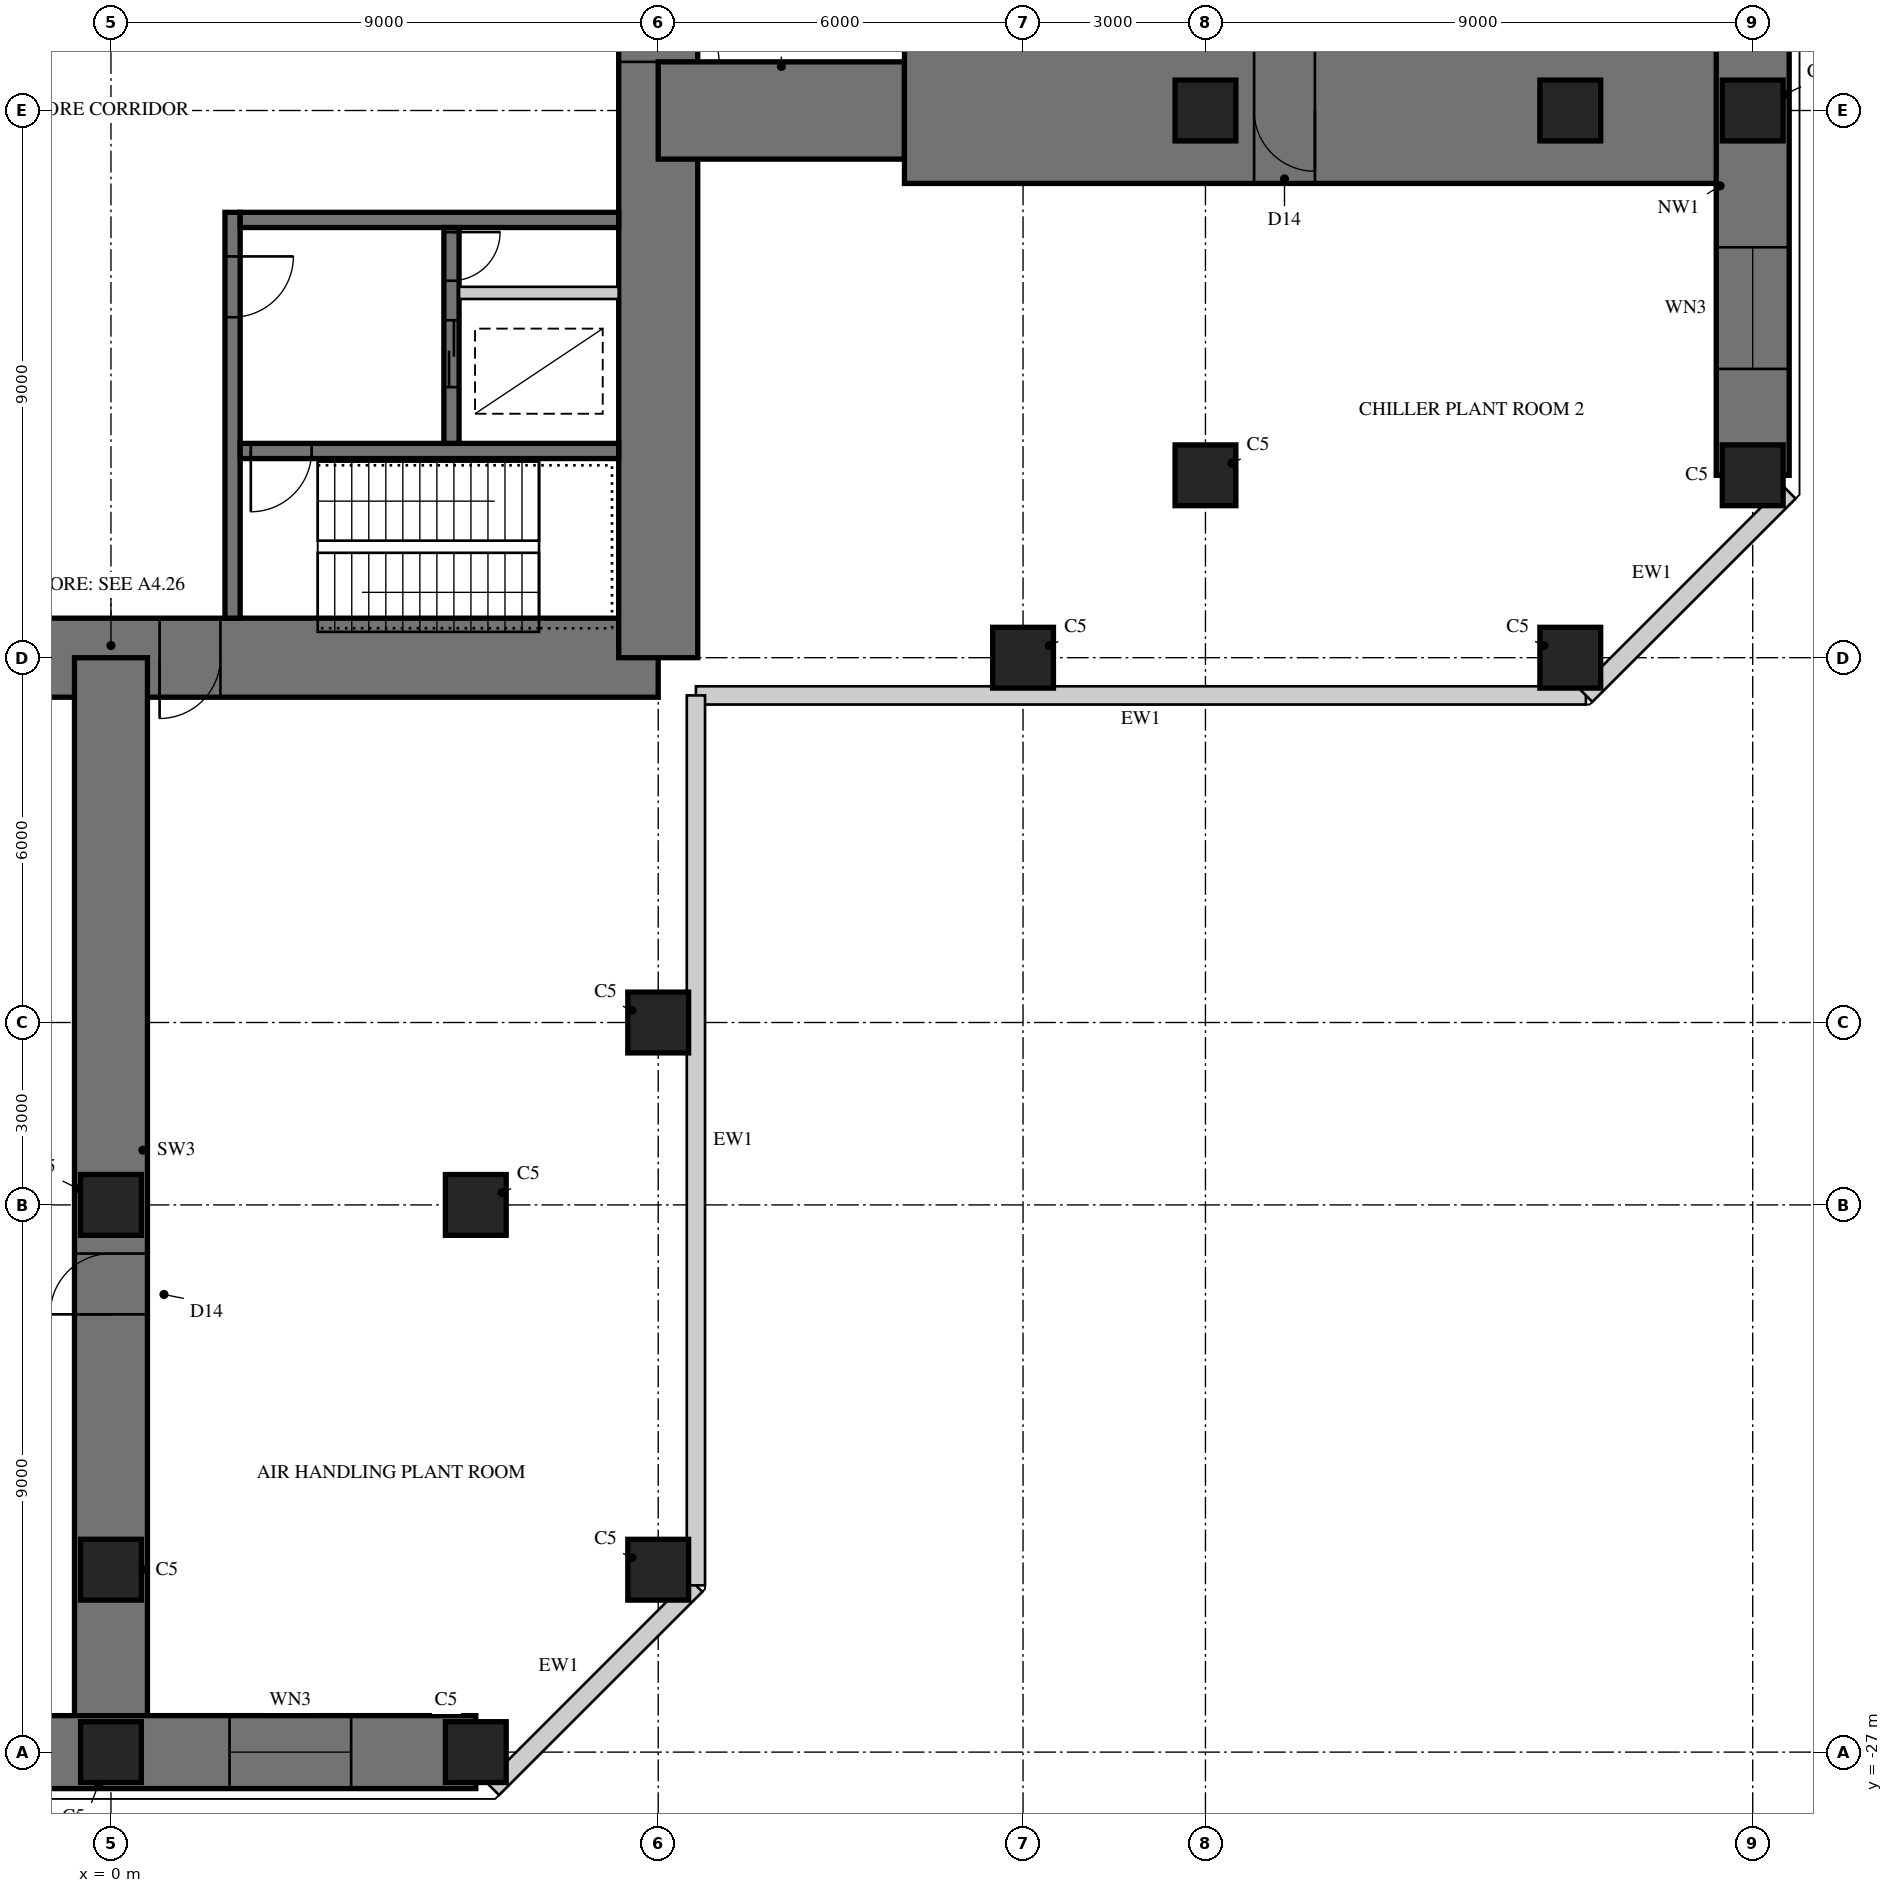
"""IFC4 building model, lengths in metres.
Left out: names, types, materials, properties, quantities, classifications, styles, units other than length and angle.
Written with IfcOpenShell. Run it as: python <this file> out.ifc"""

import sys

from ifc_helpers import new_model, si_unit, direction, frame, frame_2d, origin, origin_2d, place, context, subcontext, project, spatial, rectangle, hollow_rectangle, extrude, element, fill, save


model = new_model("IFC4")
c1 = context("Model", 3, precision=1e-05, world=origin(), true_north=direction((0.0, 1.0)))
c2 = subcontext(c1, "Body", "Model", "MODEL_VIEW")
j1 = project(units=[si_unit("LENGTHUNIT", "METRE"), si_unit("PLANEANGLEUNIT", "RADIAN")], contexts=[c1])
p1 = place(None, origin())
s1 = spatial("IfcSite", under=j1, at=p1, CompositionType="ELEMENT")
p2 = place(p1, origin())
s2 = spatial("IfcBuilding", under=s1, at=p2, CompositionType="ELEMENT")
p3 = place(p2, frame((0.0, 0.0, 164.5)))
s3 = spatial("IfcBuildingStorey", under=s2, at=p3, CompositionType="ELEMENT", Elevation=164.5)
p4 = place(p3, frame((-9.0, -9.0, 0.0), z_axis=(0.0, 0.0, 1.0), x_axis=(1.0, 0.0, 0.0)))
e1 = element("IfcWall", 1, at=p4, inside=s3, PredefinedType="SHEAR", context=c2, shape_type="SweptSolid", body=[
    extrude(rectangle(XDim=18.0, YDim=1.3, at=frame_2d((9.0, 0.0))), origin(), (0.0, 0.0, 1.0), 5.0),
])
p5 = place(p4, frame((9.8, 0.0, 0.0)))
e2 = element("IfcOpeningElement", 2, at=p5, cuts=e1, PredefinedType="OPENING", context=c2, shape_type="SweptSolid", body=[
    extrude(rectangle(XDim=1.0, YDim=2.4, at=frame_2d((0.5, 1.2))), frame((0.0, 0.66, 0.0), z_axis=(0.0, -1.0, 0.0), x_axis=(1.0, 0.0, 0.0)), (0.0, 0.0, 1.0), 1.32),
])
p6 = place(p3, frame((9.0, -9.0, 0.0), z_axis=(0.0, 0.0, 1.0), x_axis=(0.0, 1.0, 0.0)))
e3 = element("IfcWall", 3, at=p6, inside=s3, PredefinedType="SHEAR", context=c2, shape_type="SweptSolid", body=[
    extrude(rectangle(XDim=18.0, YDim=1.3, at=frame_2d((9.0, 0.0))), origin(), (0.0, 0.0, 1.0), 5.0),
])
p7 = place(p6, frame((9.8, 0.0, 0.0)))
e4 = element("IfcOpeningElement", 4, at=p7, cuts=e3, PredefinedType="OPENING", context=c2, shape_type="SweptSolid", body=[
    extrude(rectangle(XDim=1.0, YDim=2.4, at=frame_2d((0.5, 1.2))), frame((0.0, 0.66, 0.0), z_axis=(0.0, -1.0, 0.0), x_axis=(1.0, 0.0, 0.0)), (0.0, 0.0, 1.0), 1.32),
])
p8 = place(p3, frame((2.0, -1.675, 0.0), z_axis=(0.0, 0.0, 1.0), x_axis=(0.0, -1.0, 0.0)))
e5 = element("IfcWall", 5, at=p8, inside=s3, PredefinedType="SHEAR", context=c2, shape_type="SweptSolid", body=[
    extrude(rectangle(XDim=6.675, YDim=0.25, at=frame_2d((3.337, 0.0))), origin(), (0.0, 0.0, 1.0), 5.0),
])
p9 = place(p8, frame((0.725, 0.0, 0.0)))
e6 = element("IfcOpeningElement", 6, at=p9, cuts=e5, PredefinedType="OPENING", context=c2, shape_type="SweptSolid", body=[
    extrude(rectangle(XDim=1.0, YDim=2.1, at=frame_2d((0.5, 1.05))), frame((0.0, 0.135, 0.0), z_axis=(0.0, -1.0, 0.0), x_axis=(1.0, 0.0, 0.0)), (0.0, 0.0, 1.0), 0.27),
])
p10 = place(p3, frame((2.125, -1.8, 0.0), z_axis=(0.0, 0.0, 1.0), x_axis=(1.0, 0.0, 0.0)))
e7 = element("IfcWall", 7, at=p10, inside=s3, PredefinedType="SHEAR", context=c2, shape_type="SweptSolid", body=[
    extrude(rectangle(XDim=6.225, YDim=0.25, at=frame_2d((3.113, 0.0))), origin(), (0.0, 0.0, 1.0), 5.0),
])
p11 = place(p3, frame((2.125, -5.6, 0.0), z_axis=(0.0, 0.0, 1.0), x_axis=(1.0, 0.0, 0.0)))
e8 = element("IfcWall", 8, at=p11, inside=s3, PredefinedType="SHEAR", context=c2, shape_type="SweptSolid", body=[
    extrude(rectangle(XDim=6.225, YDim=0.25, at=frame_2d((3.113, 0.0))), origin(), (0.0, 0.0, 1.0), 5.0),
])
p12 = place(p11, frame((0.175, 0.0, 0.0)))
e9 = element("IfcOpeningElement", 9, at=p12, cuts=e8, PredefinedType="OPENING", context=c2, shape_type="SweptSolid", body=[
    extrude(rectangle(XDim=1.0, YDim=2.1, at=frame_2d((0.5, 1.05))), frame((0.0, 0.135, 0.0), z_axis=(0.0, -1.0, 0.0), x_axis=(1.0, 0.0, 0.0)), (0.0, 0.0, 1.0), 0.27),
])
p13 = place(p3, frame((5.6, -1.925, 0.0), z_axis=(0.0, 0.0, 1.0), x_axis=(0.0, -1.0, 0.0)))
e10 = element("IfcWall", 10, at=p13, inside=s3, PredefinedType="SHEAR", context=c2, shape_type="SweptSolid", body=[
    extrude(rectangle(XDim=3.55, YDim=0.25, at=frame_2d((1.775, 0.0))), origin(), (0.0, 0.0, 1.0), 5.0),
])
p14 = place(p13, frame((1.525, 0.0, 0.0)))
e11 = element("IfcOpeningElement", 11, at=p14, cuts=e10, PredefinedType="OPENING", context=c2, shape_type="SweptSolid", body=[
    extrude(rectangle(XDim=1.1, YDim=2.2, at=frame_2d((0.55, 1.1))), frame((0.0, 0.135, 0.0), z_axis=(0.0, -1.0, 0.0), x_axis=(1.0, 0.0, 0.0)), (0.0, 0.0, 1.0), 0.27),
])
p15 = place(p13, frame((0.075, 0.0, 0.0)))
e12 = element("IfcOpeningElement", 12, at=p15, cuts=e10, PredefinedType="OPENING", context=c2, shape_type="SweptSolid", body=[
    extrude(rectangle(XDim=0.8, YDim=2.1, at=frame_2d((0.4, 1.05))), frame((0.0, 0.135, 0.0), z_axis=(0.0, -1.0, 0.0), x_axis=(1.0, 0.0, 0.0)), (0.0, 0.0, 1.0), 0.27),
])
p16 = place(p3, frame((5.725, -3.0, 0.0), z_axis=(0.0, 0.0, 1.0), x_axis=(1.0, 0.0, 0.0)))
e13 = element("IfcWall", 13, at=p16, inside=s3, PredefinedType="PARTITIONING", context=c2, shape_type="SweptSolid", body=[
    extrude(rectangle(XDim=2.625, YDim=0.2, at=frame_2d((1.312, 0.0))), origin(), (0.0, 0.0, 1.0), 5.0),
])
p17 = place(p3, frame((9.0, 0.0, 0.0), z_axis=(0.0, 0.0, 1.0), x_axis=(1.0, 0.0, 0.0)))
e14 = element("IfcWall", 14, at=p17, inside=s3, PredefinedType="SHEAR", context=c2, shape_type="SweptSolid", body=[
    extrude(rectangle(XDim=4.05, YDim=1.6, at=frame_2d((2.025, 0.0))), origin(), (0.0, 0.0, 1.0), 5.0),
])
p18 = place(p3, frame((13.05, 0.0, 0.0), z_axis=(0.0, 0.0, 1.0), x_axis=(1.0, 0.0, 0.0)))
e15 = element("IfcWall", 15, at=p18, inside=s3, PredefinedType="SHEAR", context=c2, shape_type="SweptSolid", body=[
    extrude(rectangle(XDim=13.95, YDim=2.4, at=frame_2d((6.975, 0.0))), origin(), (0.0, 0.0, 1.0), 5.0),
])
p19 = place(p18, frame((5.75, 0.0, 0.0)))
e16 = element("IfcOpeningElement", 16, at=p19, cuts=e15, PredefinedType="OPENING", context=c2, shape_type="SweptSolid", body=[
    extrude(rectangle(XDim=1.0, YDim=2.2, at=frame_2d((0.5, 1.1))), frame((0.0, 1.21, 0.0), z_axis=(0.0, -1.0, 0.0), x_axis=(1.0, 0.0, 0.0)), (0.0, 0.0, 1.0), 2.42),
])
p20 = place(p3, frame((27.0, -6.0, 0.0), z_axis=(0.0, 0.0, 1.0), x_axis=(0.0, 1.0, 0.0)))
e17 = element("IfcWall", 17, at=p20, inside=s3, PredefinedType="SHEAR", context=c2, shape_type="SweptSolid", body=[
    extrude(rectangle(XDim=12.0, YDim=1.2, at=frame_2d((6.0, 0.0))), origin(), (0.0, 0.0, 1.0), 5.0),
])
p21 = place(p20, frame((1.75, 0.0, 0.8)))
e18 = element("IfcOpeningElement", 18, at=p21, cuts=e17, PredefinedType="OPENING", context=c2, shape_type="SweptSolid", body=[
    extrude(rectangle(XDim=2.0, YDim=2.5, at=frame_2d((1.0, 1.25))), frame((0.0, 0.61, 0.0), z_axis=(0.0, -1.0, 0.0), x_axis=(1.0, 0.0, 0.0)), (0.0, 0.0, 1.0), 1.22),
])
p22 = place(p20, frame((8.25, 0.0, 0.8)))
e19 = element("IfcOpeningElement", 19, at=p22, cuts=e17, PredefinedType="OPENING", context=c2, shape_type="SweptSolid", body=[
    extrude(rectangle(XDim=2.0, YDim=2.5, at=frame_2d((1.0, 1.25))), frame((0.0, 0.61, 0.0), z_axis=(0.0, -1.0, 0.0), x_axis=(1.0, 0.0, 0.0)), (0.0, 0.0, 1.0), 1.22),
])
p23 = place(p3, frame((0.0, -9.0, 0.0), z_axis=(0.0, 0.0, 1.0), x_axis=(0.0, -1.0, 0.0)))
e20 = element("IfcWall", 20, at=p23, inside=s3, PredefinedType="SHEAR", context=c2, shape_type="SweptSolid", body=[
    extrude(rectangle(XDim=18.0, YDim=1.2, at=frame_2d((9.0, 0.0))), origin(), (0.0, 0.0, 1.0), 5.0),
])
p24 = place(p23, frame((9.8, 0.0, 0.0)))
e21 = element("IfcOpeningElement", 21, at=p24, cuts=e20, PredefinedType="OPENING", context=c2, shape_type="SweptSolid", body=[
    extrude(rectangle(XDim=1.0, YDim=2.2, at=frame_2d((0.5, 1.1))), frame((0.0, 0.61, 0.0), z_axis=(0.0, -1.0, 0.0), x_axis=(1.0, 0.0, 0.0)), (0.0, 0.0, 1.0), 1.22),
])
p25 = place(p3, frame((-6.0, -27.0, 0.0), z_axis=(0.0, 0.0, 1.0), x_axis=(1.0, 0.0, 0.0)))
e22 = element("IfcWall", 22, at=p25, inside=s3, PredefinedType="SHEAR", context=c2, shape_type="SweptSolid", body=[
    extrude(rectangle(XDim=12.0, YDim=1.2, at=frame_2d((6.0, 0.0))), origin(), (0.0, 0.0, 1.0), 5.0),
])
p26 = place(p25, frame((2.05, 0.0, 0.8)))
e23 = element("IfcOpeningElement", 23, at=p26, cuts=e22, PredefinedType="OPENING", context=c2, shape_type="SweptSolid", body=[
    extrude(rectangle(XDim=2.0, YDim=2.5, at=frame_2d((1.0, 1.25))), frame((0.0, 0.61, 0.0), z_axis=(0.0, -1.0, 0.0), x_axis=(1.0, 0.0, 0.0)), (0.0, 0.0, 1.0), 1.22),
])
p27 = place(p25, frame((7.95, 0.0, 0.8)))
e24 = element("IfcOpeningElement", 24, at=p27, cuts=e22, PredefinedType="OPENING", context=c2, shape_type="SweptSolid", body=[
    extrude(rectangle(XDim=2.0, YDim=2.5, at=frame_2d((1.0, 1.25))), frame((0.0, 0.61, 0.0), z_axis=(0.0, -1.0, 0.0), x_axis=(1.0, 0.0, 0.0)), (0.0, 0.0, 1.0), 1.22),
])
for number, where, z_axis, x_axis in (
    (25, (15.0, -9.0, 0.0), (0.0, 0.0, 1.0), (1.0, 0.0, 0.0)),
    (26, (24.0, -9.0, 0.0), (0.0, 0.0, 1.0), (1.0, 0.0, 0.0)),
    (27, (27.0, -6.0, 0.0), (0.0, 0.0, 1.0), (1.0, 0.0, 0.0)),
    (28, (27.0, 0.0, 0.0), (0.0, 0.0, 1.0), (1.0, 0.0, 0.0)),
    (29, (9.0, -15.0, 0.0), (0.0, 0.0, 1.0), (1.0, 0.0, 0.0)),
    (30, (9.0, -24.0, 0.0), (0.0, 0.0, 1.0), (1.0, 0.0, 0.0)),
    (31, (0.0, -27.0, 0.0), (0.0, 0.0, 1.0), (1.0, 0.0, 0.0)),
    (32, (6.0, -27.0, 0.0), (0.0, 0.0, 1.0), (1.0, 0.0, 0.0)),
    (33, (18.0, -6.0, 0.0), (0.0, 0.0, 1.0), (1.0, 0.0, 0.0)),
    (34, (18.0, 0.0, 0.0), (0.0, 0.0, 1.0), (1.0, 0.0, 0.0)),
    (35, (24.0, 0.0, 0.0), (0.0, 0.0, 1.0), (1.0, 0.0, 0.0)),
    (36, (0.0, -18.0, 0.0), (0.0, 0.0, 1.0), (1.0, 0.0, 0.0)),
    (37, (6.0, -18.0, 0.0), (0.0, 0.0, 1.0), (1.0, 0.0, 0.0)),
    (38, (0.0, -24.0, 0.0), (0.0, 0.0, 1.0), (1.0, 0.0, 0.0)),
):
    element("IfcColumn", number, at=place(p3, frame(where, z_axis=z_axis, x_axis=x_axis)), inside=s3, PredefinedType="COLUMN", context=c2, shape_type="SweptSolid", body=[
        extrude(rectangle(XDim=1.0, YDim=1.0, at=origin_2d()), origin(), (0.0, 0.0, 1.0), 5.0),
    ])
p28 = place(p3, frame((9.62, -9.62, 0.0), z_axis=(0.0, 0.0, 1.0), x_axis=(1.0, 0.0, 0.0)))
e39 = element("IfcWall", 39, at=p28, inside=s3, PredefinedType="SOLIDWALL", context=c2, shape_type="SweptSolid", body=[
    extrude(rectangle(XDim=14.637, YDim=0.3, at=frame_2d((7.318, 0.0))), origin(), (0.0, 0.0, 1.0), 4.82),
])
for number, where, z_axis, x_axis in (
    (40, (24.257, -9.62, 0.0), (0.0, 0.0, 1.0), (0.707, 0.707, 0.0)),
    (41, (6.277, -27.6, 0.0), (0.0, 0.0, 1.0), (0.707, 0.707, 0.0)),
):
    element("IfcWall", number, at=place(p3, frame(where, z_axis=z_axis, x_axis=x_axis)), inside=s3, PredefinedType="SOLIDWALL", context=c2, shape_type="SweptSolid", body=[
        extrude(rectangle(XDim=4.728, YDim=0.3, at=frame_2d((2.364, 0.0))), origin(), (0.0, 0.0, 1.0), 4.82),
    ])
p29 = place(p3, frame((9.62, -24.257, 0.0), z_axis=(0.0, 0.0, 1.0), x_axis=(0.0, 1.0, 0.0)))
e42 = element("IfcWall", 42, at=p29, inside=s3, PredefinedType="SOLIDWALL", context=c2, shape_type="SweptSolid", body=[
    extrude(rectangle(XDim=14.637, YDim=0.3, at=frame_2d((7.318, 0.0))), origin(), (0.0, 0.0, 1.0), 4.82),
])
p30 = place(p21, origin())
e43 = element("IfcWindow", 43, at=p30, inside=s3, PartitioningType="SINGLE_PANEL", PredefinedType="WINDOW", context=c2, shape_type="SweptSolid", body=[
    extrude(hollow_rectangle(XDim=2.0, YDim=2.5, WallThickness=0.06, at=frame_2d((1.0, 1.25))), frame((0.0, 0.03, 0.0), z_axis=(0.0, -1.0, 0.0), x_axis=(1.0, 0.0, 0.0)), (0.0, 0.0, 1.0), 0.06),
    extrude(rectangle(XDim=1.879, YDim=2.379, at=frame_2d((1.0, 1.25))), frame((0.0, 0.03, 0.0), z_axis=(0.0, -1.0, 0.0), x_axis=(1.0, 0.0, 0.0)), (0.0, 0.0, 1.0), 0.06),
])
fill(e18, e43)
p31 = place(p27, origin())
e44 = element("IfcWindow", 44, at=p31, inside=s3, PartitioningType="SINGLE_PANEL", PredefinedType="WINDOW", context=c2, shape_type="SweptSolid", body=[
    extrude(hollow_rectangle(XDim=2.0, YDim=2.5, WallThickness=0.06, at=frame_2d((1.0, 1.25))), frame((0.0, 0.03, 0.0), z_axis=(0.0, -1.0, 0.0), x_axis=(1.0, 0.0, 0.0)), (0.0, 0.0, 1.0), 0.06),
    extrude(rectangle(XDim=1.879, YDim=2.379, at=frame_2d((1.0, 1.25))), frame((0.0, 0.03, 0.0), z_axis=(0.0, -1.0, 0.0), x_axis=(1.0, 0.0, 0.0)), (0.0, 0.0, 1.0), 0.06),
])
fill(e24, e44)
p32 = place(p19, frame((1.0, 0.0, 0.0), z_axis=(0.0, 0.0, 1.0), x_axis=(-1.0, 0.0, 0.0)))
e45 = element("IfcDoor", 45, at=p32, inside=s3, OperationType="SINGLE_SWING_LEFT", PredefinedType="DOOR", context=c2, shape_type="SweptSolid", body=[
    extrude(rectangle(XDim=1.0, YDim=2.2, at=frame_2d((0.5, 1.1))), frame((0.0, 0.025, 0.0), z_axis=(0.0, -1.0, 0.0), x_axis=(1.0, 0.0, 0.0)), (0.0, 0.0, 1.0), 0.05),
])
fill(e16, e45)
p33 = place(p24, frame((1.0, 0.0, 0.0), z_axis=(0.0, 0.0, 1.0), x_axis=(-1.0, 0.0, 0.0)))
e46 = element("IfcDoor", 46, at=p33, inside=s3, OperationType="SINGLE_SWING_LEFT", PredefinedType="DOOR", context=c2, shape_type="SweptSolid", body=[
    extrude(rectangle(XDim=1.0, YDim=2.2, at=frame_2d((0.5, 1.1))), frame((0.0, 0.025, 0.0), z_axis=(0.0, -1.0, 0.0), x_axis=(1.0, 0.0, 0.0)), (0.0, 0.0, 1.0), 0.05),
])
fill(e21, e46)
p34 = place(p5, frame((1.0, 0.0, 0.0), z_axis=(0.0, 0.0, 1.0), x_axis=(-1.0, 0.0, 0.0)))
e47 = element("IfcDoor", 47, at=p34, inside=s3, OperationType="SINGLE_SWING_RIGHT", PredefinedType="DOOR", context=c2, shape_type="SweptSolid", body=[
    extrude(rectangle(XDim=1.0, YDim=2.4, at=frame_2d((0.5, 1.2))), frame((0.0, -0.005, 0.0), z_axis=(0.0, -1.0, 0.0), x_axis=(1.0, 0.0, 0.0)), (0.0, 0.0, 1.0), 0.05),
])
fill(e2, e47)
p35 = place(p7, frame((1.0, 0.0, 0.0), z_axis=(0.0, 0.0, 1.0), x_axis=(-1.0, 0.0, 0.0)))
e48 = element("IfcDoor", 48, at=p35, inside=s3, OperationType="SINGLE_SWING_RIGHT", PredefinedType="DOOR", context=c2, shape_type="SweptSolid", body=[
    extrude(rectangle(XDim=1.0, YDim=2.4, at=frame_2d((0.5, 1.2))), frame((0.0, -0.005, 0.0), z_axis=(0.0, -1.0, 0.0), x_axis=(1.0, 0.0, 0.0)), (0.0, 0.0, 1.0), 0.05),
])
fill(e4, e48)
p36 = place(p9, origin())
e49 = element("IfcDoor", 49, at=p36, inside=s3, OperationType="SINGLE_SWING_LEFT", PredefinedType="DOOR", context=c2, shape_type="SweptSolid", body=[
    extrude(rectangle(XDim=1.0, YDim=2.1, at=frame_2d((0.5, 1.05))), frame((0.0, 0.025, 0.0), z_axis=(0.0, -1.0, 0.0), x_axis=(1.0, 0.0, 0.0)), (0.0, 0.0, 1.0), 0.05),
])
fill(e6, e49)
p37 = place(p12, frame((1.0, 0.0, 0.0), z_axis=(0.0, 0.0, 1.0), x_axis=(-1.0, 0.0, 0.0)))
e50 = element("IfcDoor", 50, at=p37, inside=s3, OperationType="SINGLE_SWING_RIGHT", PredefinedType="DOOR", context=c2, shape_type="SweptSolid", body=[
    extrude(rectangle(XDim=1.0, YDim=2.1, at=frame_2d((0.5, 1.05))), frame((0.0, 0.025, 0.0), z_axis=(0.0, -1.0, 0.0), x_axis=(1.0, 0.0, 0.0)), (0.0, 0.0, 1.0), 0.05),
])
fill(e9, e50)
p38 = place(p14, origin())
e51 = element("IfcDoor", 51, at=p38, inside=s3, OperationType="DOUBLE_DOOR_SLIDING", PredefinedType="DOOR", context=c2, shape_type="SweptSolid", body=[
    extrude(rectangle(XDim=1.1, YDim=2.2, at=frame_2d((0.55, 1.1))), frame((0.0, 0.025, 0.0), z_axis=(0.0, -1.0, 0.0), x_axis=(1.0, 0.0, 0.0)), (0.0, 0.0, 1.0), 0.05),
])
fill(e11, e51)
p39 = place(p15, origin())
e52 = element("IfcDoor", 52, at=p39, inside=s3, OperationType="SINGLE_SWING_LEFT", PredefinedType="DOOR", context=c2, shape_type="SweptSolid", body=[
    extrude(rectangle(XDim=0.8, YDim=2.1, at=frame_2d((0.4, 1.05))), frame((0.0, 0.025, 0.0), z_axis=(0.0, -1.0, 0.0), x_axis=(1.0, 0.0, 0.0)), (0.0, 0.0, 1.0), 0.05),
])
fill(e12, e52)
save(model, sys.argv[1])
